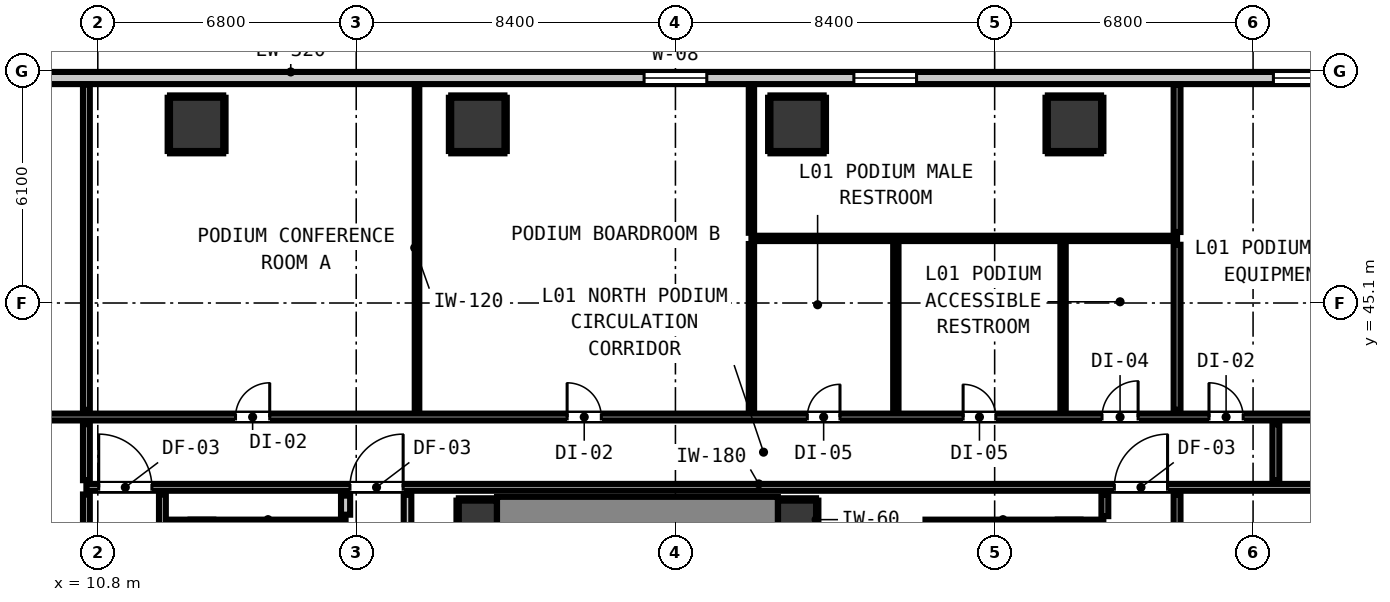
"""IFC4 building model, lengths in metres.
Left out: names, types, materials, properties, quantities, classifications, styles, units other than length and angle.
Written with IfcOpenShell. Run it as: python <this file> out.ifc"""

import sys

from ifc_helpers import new_model, si_unit, direction, frame, frame_2d, origin, origin_2d, place, context, subcontext, project, spatial, rectangle, extrude, element, fill, save


model = new_model("IFC4")
c1 = context("Model", 3, precision=1e-05, world=origin(), true_north=direction((0.0, 1.0)))
c2 = subcontext(c1, "Body", "Model", "MODEL_VIEW")
j1 = project(units=[si_unit("LENGTHUNIT", "METRE"), si_unit("PLANEANGLEUNIT", "RADIAN")], contexts=[c1])
p1 = place(None, origin())
s1 = spatial("IfcSite", under=j1, at=p1, CompositionType="ELEMENT")
p2 = place(p1, origin())
s2 = spatial("IfcBuilding", under=s1, at=p2, CompositionType="ELEMENT")
p3 = place(p2, frame((0.0, 0.0, 5.2)))
s3 = spatial("IfcBuildingStorey", under=s2, at=p3, CompositionType="ELEMENT", Elevation=5.2)
for number, where, z_axis, x_axis in (
    (1, (20.8, 39.4, 0.0), (0.0, 0.0, 1.0), (1.0, 0.0, 0.0)),
    (2, (29.2, 39.4, 0.0), (0.0, 0.0, 1.0), (1.0, 0.0, 0.0)),
):
    element("IfcColumn", number, at=place(p3, frame(where, z_axis=z_axis, x_axis=x_axis)), inside=s3, PredefinedType="COLUMN", context=c2, shape_type="SweptSolid", body=[
        extrude(rectangle(XDim=1.0, YDim=1.0, at=origin_2d()), origin(), (0.0, 0.0, 1.0), 4.2),
    ])
p4 = place(p3, frame((13.24, 31.205, 0.0), z_axis=(0.0, 0.0, 1.0), x_axis=(0.0, 1.0, 0.0)))
e3 = element("IfcWall", 3, at=p4, inside=s3, PredefinedType="SHEAR", context=c2, shape_type="SweptSolid", body=[
    extrude(rectangle(XDim=8.195, YDim=1.2, at=frame_2d((4.097, 0.0))), origin(), (0.0, 0.0, 1.0), 4.2),
])
p5 = place(p3, frame((13.24, 39.1, 0.0), z_axis=(0.0, 0.0, 1.0), x_axis=(1.0, 0.0, 0.0)))
e4 = element("IfcWall", 4, at=p5, inside=s3, PredefinedType="SHEAR", context=c2, shape_type="SweptSolid", body=[
    extrude(rectangle(XDim=4.08, YDim=0.6, at=frame_2d((2.04, 0.0))), origin(), (0.0, 0.0, 1.0), 4.2),
])
p6 = place(p3, frame((36.66, 31.205, 0.0), z_axis=(0.0, 0.0, 1.0), x_axis=(0.0, 1.0, 0.0)))
e5 = element("IfcWall", 5, at=p6, inside=s3, PredefinedType="SHEAR", context=c2, shape_type="SweptSolid", body=[
    extrude(rectangle(XDim=8.195, YDim=1.2, at=frame_2d((4.097, 0.0))), origin(), (0.0, 0.0, 1.0), 4.2),
])
p7 = place(p3, frame((32.58, 39.1, 0.0), z_axis=(0.0, 0.0, 1.0), x_axis=(1.0, 0.0, 0.0)))
e6 = element("IfcWall", 6, at=p7, inside=s3, PredefinedType="SHEAR", context=c2, shape_type="SweptSolid", body=[
    extrude(rectangle(XDim=4.08, YDim=0.6, at=frame_2d((2.04, 0.0))), origin(), (0.0, 0.0, 1.0), 4.2),
])
p8 = place(p3, frame((21.305, 39.4, 0.0), z_axis=(0.0, 0.0, 1.0), x_axis=(1.0, 0.0, 0.0)))
e7 = element("IfcWall", 7, at=p8, inside=s3, PredefinedType="SHEAR", context=c2, shape_type="SweptSolid", body=[
    extrude(rectangle(XDim=7.39, YDim=1.2, at=frame_2d((3.695, 0.0))), origin(), (0.0, 0.0, 1.0), 4.2),
])
for number, where, z_axis, x_axis in (
    (8, (13.4, 49.8, 0.0), (0.0, 0.0, 1.0), (1.0, 0.0, 0.0)),
    (9, (20.8, 49.8, 0.0), (0.0, 0.0, 1.0), (1.0, 0.0, 0.0)),
    (10, (29.2, 49.8, 0.0), (0.0, 0.0, 1.0), (1.0, 0.0, 0.0)),
    (11, (36.5, 49.8, 0.0), (0.0, 0.0, 1.0), (1.0, 0.0, 0.0)),
):
    element("IfcColumn", number, at=place(p3, frame(where, z_axis=z_axis, x_axis=x_axis)), inside=s3, PredefinedType="COLUMN", context=c2, shape_type="SweptSolid", body=[
        extrude(rectangle(XDim=1.4, YDim=1.4, at=origin_2d()), origin(), (0.0, 0.0, 1.0), 4.2),
    ])
p9 = place(p3, frame((6.68, 51.02, 0.0), z_axis=(0.0, 0.0, 1.0), x_axis=(1.0, 0.0, 0.0)))
e12 = element("IfcWall", 12, at=p9, inside=s3, PredefinedType="STANDARD", context=c2, shape_type="SweptSolid", body=[
    extrude(rectangle(XDim=38.64, YDim=0.32, at=frame_2d((19.32, 0.0))), origin(), (0.0, 0.0, 1.0), 3.92),
])
p10 = place(p9, frame((18.495, 0.0, 0.9)))
e13 = element("IfcOpeningElement", 13, at=p10, cuts=e12, PredefinedType="OPENING", context=c2, shape_type="SweptSolid", body=[
    extrude(rectangle(XDim=1.65, YDim=1.75, at=frame_2d((0.825, 0.875))), frame((0.0, 0.17, 0.0), z_axis=(0.0, -1.0, 0.0), x_axis=(1.0, 0.0, 0.0)), (0.0, 0.0, 1.0), 0.34),
])
p11 = place(p9, frame((24.015, 0.0, 0.9)))
e14 = element("IfcOpeningElement", 14, at=p11, cuts=e12, PredefinedType="OPENING", context=c2, shape_type="SweptSolid", body=[
    extrude(rectangle(XDim=1.65, YDim=1.75, at=frame_2d((0.825, 0.875))), frame((0.0, 0.17, 0.0), z_axis=(0.0, -1.0, 0.0), x_axis=(1.0, 0.0, 0.0)), (0.0, 0.0, 1.0), 0.34),
])
p12 = place(p9, frame((35.055, 0.0, 0.9)))
e15 = element("IfcOpeningElement", 15, at=p12, cuts=e12, PredefinedType="OPENING", context=c2, shape_type="SweptSolid", body=[
    extrude(rectangle(XDim=1.65, YDim=1.75, at=frame_2d((0.825, 0.875))), frame((0.0, 0.17, 0.0), z_axis=(0.0, -1.0, 0.0), x_axis=(1.0, 0.0, 0.0)), (0.0, 0.0, 1.0), 0.34),
])
p13 = place(p3, frame((10.5, 40.25, 0.0), z_axis=(0.0, 0.0, 1.0), x_axis=(1.0, 0.0, 0.0)))
e16 = element("IfcWall", 16, at=p13, inside=s3, PredefinedType="PARTITIONING", context=c2, shape_type="SweptSolid", body=[
    extrude(rectangle(XDim=37.148, YDim=0.18, at=frame_2d((18.574, 0.0))), origin(), (0.0, 0.0, 1.0), 3.92),
])
p14 = place(p13, frame((6.935, 0.0, 0.0)))
e17 = element("IfcOpeningElement", 17, at=p14, cuts=e16, PredefinedType="OPENING", context=c2, shape_type="SweptSolid", body=[
    extrude(rectangle(XDim=1.4, YDim=2.15, at=frame_2d((0.7, 1.075))), frame((0.0, 0.1, 0.0), z_axis=(0.0, -1.0, 0.0), x_axis=(1.0, 0.0, 0.0)), (0.0, 0.0, 1.0), 0.2),
])
p15 = place(p13, frame((0.324, 0.0, 0.0)))
e18 = element("IfcOpeningElement", 18, at=p15, cuts=e16, PredefinedType="OPENING", context=c2, shape_type="SweptSolid", body=[
    extrude(rectangle(XDim=1.4, YDim=2.15, at=frame_2d((0.7, 1.075))), frame((0.0, 0.1, 0.0), z_axis=(0.0, -1.0, 0.0), x_axis=(1.0, 0.0, 0.0)), (0.0, 0.0, 1.0), 0.2),
])
p16 = place(p13, frame((27.05, 0.0, 0.0)))
e19 = element("IfcOpeningElement", 19, at=p16, cuts=e16, PredefinedType="OPENING", context=c2, shape_type="SweptSolid", body=[
    extrude(rectangle(XDim=1.4, YDim=2.15, at=frame_2d((0.7, 1.075))), frame((0.0, 0.1, 0.0), z_axis=(0.0, -1.0, 0.0), x_axis=(1.0, 0.0, 0.0)), (0.0, 0.0, 1.0), 0.2),
])
p17 = place(p3, frame((4.352, 42.1, 0.0), z_axis=(0.0, 0.0, 1.0), x_axis=(1.0, 0.0, 0.0)))
e20 = element("IfcWall", 20, at=p17, inside=s3, PredefinedType="PARTITIONING", context=c2, shape_type="SweptSolid", body=[
    extrude(rectangle(XDim=43.296, YDim=0.18, at=frame_2d((21.648, 0.0))), origin(), (0.0, 0.0, 1.0), 3.92),
])
p18 = place(p17, frame((10.072, 0.0, 0.0)))
e21 = element("IfcOpeningElement", 21, at=p18, cuts=e20, PredefinedType="OPENING", context=c2, shape_type="SweptSolid", body=[
    extrude(rectangle(XDim=0.9, YDim=2.1, at=frame_2d((0.45, 1.05))), frame((0.0, 0.1, 0.0), z_axis=(0.0, -1.0, 0.0), x_axis=(1.0, 0.0, 0.0)), (0.0, 0.0, 1.0), 0.2),
])
p19 = place(p17, frame((18.798, 0.0, 0.0)))
e22 = element("IfcOpeningElement", 22, at=p19, cuts=e20, PredefinedType="OPENING", context=c2, shape_type="SweptSolid", body=[
    extrude(rectangle(XDim=0.9, YDim=2.1, at=frame_2d((0.45, 1.05))), frame((0.0, 0.1, 0.0), z_axis=(0.0, -1.0, 0.0), x_axis=(1.0, 0.0, 0.0)), (0.0, 0.0, 1.0), 0.2),
])
p20 = place(p17, frame((25.118, 0.0, 0.0)))
e23 = element("IfcOpeningElement", 23, at=p20, cuts=e20, PredefinedType="OPENING", context=c2, shape_type="SweptSolid", body=[
    extrude(rectangle(XDim=0.86, YDim=2.02, at=frame_2d((0.43, 1.01))), frame((0.0, 0.1, 0.0), z_axis=(0.0, -1.0, 0.0), x_axis=(1.0, 0.0, 0.0)), (0.0, 0.0, 1.0), 0.2),
])
p21 = place(p17, frame((29.218, 0.0, 0.0)))
e24 = element("IfcOpeningElement", 24, at=p21, cuts=e20, PredefinedType="OPENING", context=c2, shape_type="SweptSolid", body=[
    extrude(rectangle(XDim=0.86, YDim=2.02, at=frame_2d((0.43, 1.01))), frame((0.0, 0.1, 0.0), z_axis=(0.0, -1.0, 0.0), x_axis=(1.0, 0.0, 0.0)), (0.0, 0.0, 1.0), 0.2),
])
p22 = place(p17, frame((32.873, 0.0, 0.0)))
e25 = element("IfcOpeningElement", 25, at=p22, cuts=e20, PredefinedType="OPENING", context=c2, shape_type="SweptSolid", body=[
    extrude(rectangle(XDim=0.95, YDim=2.1, at=frame_2d((0.475, 1.05))), frame((0.0, 0.1, 0.0), z_axis=(0.0, -1.0, 0.0), x_axis=(1.0, 0.0, 0.0)), (0.0, 0.0, 1.0), 0.2),
])
p23 = place(p17, frame((35.688, 0.0, 0.0)))
e26 = element("IfcOpeningElement", 26, at=p23, cuts=e20, PredefinedType="OPENING", context=c2, shape_type="SweptSolid", body=[
    extrude(rectangle(XDim=0.9, YDim=2.1, at=frame_2d((0.45, 1.05))), frame((0.0, 0.1, 0.0), z_axis=(0.0, -1.0, 0.0), x_axis=(1.0, 0.0, 0.0)), (0.0, 0.0, 1.0), 0.2),
])
p24 = place(p3, frame((28.0, 46.8, 0.0), z_axis=(0.0, 0.0, 1.0), x_axis=(1.0, 0.0, 0.0)))
e27 = element("IfcWall", 27, at=p24, inside=s3, PredefinedType="PARTITIONING", context=c2, shape_type="SweptSolid", body=[
    extrude(rectangle(XDim=11.2, YDim=0.14, at=frame_2d((5.6, 0.0))), origin(), (0.0, 0.0, 1.0), 3.92),
])
p25 = place(p3, frame((17.32, 39.53, 0.0), z_axis=(0.0, 0.0, 1.0), x_axis=(0.0, 1.0, 0.0)))
e28 = element("IfcWall", 28, at=p25, inside=s3, PredefinedType="PARTITIONING", context=c2, shape_type="SweptSolid", body=[
    extrude(rectangle(XDim=0.502, YDim=0.24, at=frame_2d((0.251, 0.0))), origin(), (0.0, 0.0, 1.0), 3.92),
])
p26 = place(p3, frame((18.95, 38.928, 0.0), z_axis=(0.0, 0.0, 1.0), x_axis=(0.0, 1.0, 0.0)))
e29 = element("IfcWall", 29, at=p26, inside=s3, PredefinedType="PARTITIONING", context=c2, shape_type="SweptSolid", body=[
    extrude(rectangle(XDim=1.124, YDim=0.2, at=frame_2d((0.562, 0.0))), origin(), (0.0, 0.0, 1.0), 3.92),
])
p27 = place(p3, frame((10.5, 21.368, 0.0), z_axis=(0.0, 0.0, 1.0), x_axis=(0.0, 1.0, 0.0)))
e30 = element("IfcWall", 30, at=p27, inside=s3, PredefinedType="PARTITIONING", context=c2, shape_type="SweptSolid", body=[
    extrude(rectangle(XDim=18.694, YDim=0.18, at=frame_2d((9.347, 0.0))), origin(), (0.0, 0.0, 1.0), 3.92),
])
p28 = place(p3, frame((10.5, 40.438, 0.0), z_axis=(0.0, 0.0, 1.0), x_axis=(0.0, 1.0, 0.0)))
e31 = element("IfcWall", 31, at=p28, inside=s3, PredefinedType="PARTITIONING", context=c2, shape_type="SweptSolid", body=[
    extrude(rectangle(XDim=1.474, YDim=0.18, at=frame_2d((0.737, 0.0))), origin(), (0.0, 0.0, 1.0), 3.92),
])
p29 = place(p3, frame((10.5, 42.288, 0.0), z_axis=(0.0, 0.0, 1.0), x_axis=(0.0, 1.0, 0.0)))
e32 = element("IfcWall", 32, at=p29, inside=s3, PredefinedType="PARTITIONING", context=c2, shape_type="SweptSolid", body=[
    extrude(rectangle(XDim=8.56, YDim=0.18, at=frame_2d((4.28, 0.0))), origin(), (0.0, 0.0, 1.0), 3.92),
])
p30 = place(p3, frame((12.5, 21.368, 0.0), z_axis=(0.0, 0.0, 1.0), x_axis=(0.0, 1.0, 0.0)))
e33 = element("IfcWall", 33, at=p30, inside=s3, PredefinedType="PARTITIONING", context=c2, shape_type="SweptSolid", body=[
    extrude(rectangle(XDim=18.694, YDim=0.18, at=frame_2d((9.347, 0.0))), origin(), (0.0, 0.0, 1.0), 3.92),
])
p31 = place(p3, frame((37.3, 39.492, 0.0), z_axis=(0.0, 0.0, 1.0), x_axis=(0.0, 1.0, 0.0)))
e34 = element("IfcWall", 34, at=p31, inside=s3, PredefinedType="PARTITIONING", context=c2, shape_type="SweptSolid", body=[
    extrude(rectangle(XDim=0.57, YDim=0.18, at=frame_2d((0.285, 0.0))), origin(), (0.0, 0.0, 1.0), 3.92),
])
p32 = place(p3, frame((39.2, 21.368, 0.0), z_axis=(0.0, 0.0, 1.0), x_axis=(0.0, 1.0, 0.0)))
e35 = element("IfcWall", 35, at=p32, inside=s3, PredefinedType="PARTITIONING", context=c2, shape_type="SweptSolid", body=[
    extrude(rectangle(XDim=18.694, YDim=0.18, at=frame_2d((9.347, 0.0))), origin(), (0.0, 0.0, 1.0), 3.92),
])
p33 = place(p3, frame((39.2, 42.288, 0.0), z_axis=(0.0, 0.0, 1.0), x_axis=(0.0, 1.0, 0.0)))
e36 = element("IfcWall", 36, at=p33, inside=s3, PredefinedType="PARTITIONING", context=c2, shape_type="SweptSolid", body=[
    extrude(rectangle(XDim=4.344, YDim=0.18, at=frame_2d((2.172, 0.0))), origin(), (0.0, 0.0, 1.0), 3.92),
])
p34 = place(p3, frame((39.2, 46.968, 0.0), z_axis=(0.0, 0.0, 1.0), x_axis=(0.0, 1.0, 0.0)))
e37 = element("IfcWall", 37, at=p34, inside=s3, PredefinedType="PARTITIONING", context=c2, shape_type="SweptSolid", body=[
    extrude(rectangle(XDim=3.88, YDim=0.18, at=frame_2d((1.94, 0.0))), origin(), (0.0, 0.0, 1.0), 3.92),
])
p35 = place(p3, frame((41.8, 40.438, 0.0), z_axis=(0.0, 0.0, 1.0), x_axis=(0.0, 1.0, 0.0)))
e38 = element("IfcWall", 38, at=p35, inside=s3, PredefinedType="PARTITIONING", context=c2, shape_type="SweptSolid", body=[
    extrude(rectangle(XDim=1.474, YDim=0.18, at=frame_2d((0.737, 0.0))), origin(), (0.0, 0.0, 1.0), 3.92),
])
p36 = place(p3, frame((28.0, 42.268, 0.0), z_axis=(0.0, 0.0, 1.0), x_axis=(0.0, 1.0, 0.0)))
e39 = element("IfcWall", 39, at=p36, inside=s3, PredefinedType="PARTITIONING", context=c2, shape_type="SweptSolid", body=[
    extrude(rectangle(XDim=4.384, YDim=0.14, at=frame_2d((2.192, 0.0))), origin(), (0.0, 0.0, 1.0), 3.92),
])
p37 = place(p3, frame((28.0, 46.948, 0.0), z_axis=(0.0, 0.0, 1.0), x_axis=(0.0, 1.0, 0.0)))
e40 = element("IfcWall", 40, at=p37, inside=s3, PredefinedType="PARTITIONING", context=c2, shape_type="SweptSolid", body=[
    extrude(rectangle(XDim=3.9, YDim=0.14, at=frame_2d((1.95, 0.0))), origin(), (0.0, 0.0, 1.0), 3.92),
])
for number, where, z_axis, x_axis in (
    (41, (31.8, 42.268, 0.0), (0.0, 0.0, 1.0), (0.0, 1.0, 0.0)),
    (42, (36.2, 42.268, 0.0), (0.0, 0.0, 1.0), (0.0, 1.0, 0.0)),
):
    element("IfcWall", number, at=place(p3, frame(where, z_axis=z_axis, x_axis=x_axis)), inside=s3, PredefinedType="PARTITIONING", context=c2, shape_type="SweptSolid", body=[
        extrude(rectangle(XDim=4.384, YDim=0.14, at=frame_2d((2.192, 0.0))), origin(), (0.0, 0.0, 1.0), 3.92),
    ])
p38 = place(p3, frame((19.2, 42.258, 0.0), z_axis=(0.0, 0.0, 1.0), x_axis=(0.0, 1.0, 0.0)))
e43 = element("IfcWall", 43, at=p38, inside=s3, PredefinedType="PARTITIONING", context=c2, shape_type="SweptSolid", body=[
    extrude(rectangle(XDim=8.59, YDim=0.12, at=frame_2d((4.295, 0.0))), origin(), (0.0, 0.0, 1.0), 3.92),
])
p39 = place(p3, frame((20.3, 39.932, 0.0), z_axis=(0.0, 0.0, 1.0), x_axis=(1.0, 0.0, 0.0)))
e44 = element("IfcWall", 44, at=p39, inside=s3, PredefinedType="PARTITIONING", context=c2, shape_type="SweptSolid", body=[
    extrude(rectangle(XDim=0.99, YDim=0.06, at=frame_2d((0.495, 0.0))), origin(), (0.0, 0.0, 1.0), 1.45),
])
p40 = place(p3, frame((20.268, 38.9, 0.0), z_axis=(0.0, 0.0, 1.0), x_axis=(0.0, 1.0, 0.0)))
e45 = element("IfcWall", 45, at=p40, inside=s3, PredefinedType="PARTITIONING", context=c2, shape_type="SweptSolid", body=[
    extrude(rectangle(XDim=1.0, YDim=0.06, at=frame_2d((0.5, 0.0))), origin(), (0.0, 0.0, 1.0), 1.45),
])
p41 = place(p3, frame((28.71, 39.932, 0.0), z_axis=(0.0, 0.0, 1.0), x_axis=(1.0, 0.0, 0.0)))
e46 = element("IfcWall", 46, at=p41, inside=s3, PredefinedType="PARTITIONING", context=c2, shape_type="SweptSolid", body=[
    extrude(rectangle(XDim=0.99, YDim=0.06, at=frame_2d((0.495, 0.0))), origin(), (0.0, 0.0, 1.0), 1.45),
])
p42 = place(p3, frame((29.732, 38.9, 0.0), z_axis=(0.0, 0.0, 1.0), x_axis=(0.0, 1.0, 0.0)))
e47 = element("IfcWall", 47, at=p42, inside=s3, PredefinedType="PARTITIONING", context=c2, shape_type="SweptSolid", body=[
    extrude(rectangle(XDim=1.0, YDim=0.06, at=frame_2d((0.5, 0.0))), origin(), (0.0, 0.0, 1.0), 1.45),
])
for number, where, z_axis, x_axis in (
    (48, (12.7, 49.068, 0.0), (0.0, 0.0, 1.0), (1.0, 0.0, 0.0)),
    (49, (12.7, 50.532, 0.0), (0.0, 0.0, 1.0), (1.0, 0.0, 0.0)),
):
    element("IfcWall", number, at=place(p3, frame(where, z_axis=z_axis, x_axis=x_axis)), inside=s3, PredefinedType="PARTITIONING", context=c2, shape_type="SweptSolid", body=[
        extrude(rectangle(XDim=1.4, YDim=0.06, at=frame_2d((0.7, 0.0))), origin(), (0.0, 0.0, 1.0), 1.45),
    ])
for number, where, z_axis, x_axis in (
    (50, (12.668, 49.1, 0.0), (0.0, 0.0, 1.0), (0.0, 1.0, 0.0)),
    (51, (14.132, 49.1, 0.0), (0.0, 0.0, 1.0), (0.0, 1.0, 0.0)),
    (52, (20.1, 49.068, 0.0), (0.0, 0.0, 1.0), (1.0, 0.0, 0.0)),
    (53, (20.1, 50.532, 0.0), (0.0, 0.0, 1.0), (1.0, 0.0, 0.0)),
    (54, (20.068, 49.1, 0.0), (0.0, 0.0, 1.0), (0.0, 1.0, 0.0)),
    (55, (21.532, 49.1, 0.0), (0.0, 0.0, 1.0), (0.0, 1.0, 0.0)),
    (56, (28.5, 49.068, 0.0), (0.0, 0.0, 1.0), (1.0, 0.0, 0.0)),
    (57, (28.5, 50.532, 0.0), (0.0, 0.0, 1.0), (1.0, 0.0, 0.0)),
    (58, (28.468, 49.1, 0.0), (0.0, 0.0, 1.0), (0.0, 1.0, 0.0)),
    (59, (29.932, 49.1, 0.0), (0.0, 0.0, 1.0), (0.0, 1.0, 0.0)),
    (60, (35.8, 49.068, 0.0), (0.0, 0.0, 1.0), (1.0, 0.0, 0.0)),
    (61, (35.8, 50.532, 0.0), (0.0, 0.0, 1.0), (1.0, 0.0, 0.0)),
    (62, (35.768, 49.1, 0.0), (0.0, 0.0, 1.0), (0.0, 1.0, 0.0)),
    (63, (37.232, 49.1, 0.0), (0.0, 0.0, 1.0), (0.0, 1.0, 0.0)),
):
    element("IfcWall", number, at=place(p3, frame(where, z_axis=z_axis, x_axis=x_axis)), inside=s3, PredefinedType="PARTITIONING", context=c2, shape_type="SweptSolid", body=[
        extrude(rectangle(XDim=1.4, YDim=0.06, at=frame_2d((0.7, 0.0))), origin(), (0.0, 0.0, 1.0), 1.45),
    ])
p43 = place(p10, origin())
e64 = element("IfcWindow", 64, at=p43, inside=s3, PartitioningType="SINGLE_PANEL", PredefinedType="WINDOW", context=c2, shape_type="SweptSolid", body=[
    extrude(rectangle(XDim=1.65, YDim=1.75, at=frame_2d((0.825, 0.875))), frame((0.0, 0.03, 0.0), z_axis=(0.0, -1.0, 0.0), x_axis=(1.0, 0.0, 0.0)), (0.0, 0.0, 1.0), 0.06),
])
fill(e13, e64)
p44 = place(p11, origin())
e65 = element("IfcWindow", 65, at=p44, inside=s3, PartitioningType="SINGLE_PANEL", PredefinedType="WINDOW", context=c2, shape_type="SweptSolid", body=[
    extrude(rectangle(XDim=1.65, YDim=1.75, at=frame_2d((0.825, 0.875))), frame((0.0, 0.03, 0.0), z_axis=(0.0, -1.0, 0.0), x_axis=(1.0, 0.0, 0.0)), (0.0, 0.0, 1.0), 0.06),
])
fill(e14, e65)
p45 = place(p12, origin())
e66 = element("IfcWindow", 66, at=p45, inside=s3, PartitioningType="SINGLE_PANEL", PredefinedType="WINDOW", context=c2, shape_type="SweptSolid", body=[
    extrude(rectangle(XDim=1.65, YDim=1.75, at=frame_2d((0.825, 0.875))), frame((0.0, 0.03, 0.0), z_axis=(0.0, -1.0, 0.0), x_axis=(1.0, 0.0, 0.0)), (0.0, 0.0, 1.0), 0.06),
])
fill(e15, e66)
p46 = place(p14, origin())
e67 = element("IfcDoor", 67, at=p46, inside=s3, OperationType="SINGLE_SWING_RIGHT", PredefinedType="DOOR", context=c2, shape_type="SweptSolid", body=[
    extrude(rectangle(XDim=1.4, YDim=2.15, at=frame_2d((0.7, 1.075))), frame((0.0, 0.025, 0.0), z_axis=(0.0, -1.0, 0.0), x_axis=(1.0, 0.0, 0.0)), (0.0, 0.0, 1.0), 0.05),
])
fill(e17, e67)
p47 = place(p15, origin())
e68 = element("IfcDoor", 68, at=p47, inside=s3, OperationType="SINGLE_SWING_LEFT", PredefinedType="DOOR", context=c2, shape_type="SweptSolid", body=[
    extrude(rectangle(XDim=1.4, YDim=2.15, at=frame_2d((0.7, 1.075))), frame((0.0, 0.025, 0.0), z_axis=(0.0, -1.0, 0.0), x_axis=(1.0, 0.0, 0.0)), (0.0, 0.0, 1.0), 0.05),
])
fill(e18, e68)
p48 = place(p16, origin())
e69 = element("IfcDoor", 69, at=p48, inside=s3, OperationType="SINGLE_SWING_RIGHT", PredefinedType="DOOR", context=c2, shape_type="SweptSolid", body=[
    extrude(rectangle(XDim=1.4, YDim=2.15, at=frame_2d((0.7, 1.075))), frame((0.0, 0.025, 0.0), z_axis=(0.0, -1.0, 0.0), x_axis=(1.0, 0.0, 0.0)), (0.0, 0.0, 1.0), 0.05),
])
fill(e19, e69)
p49 = place(p18, origin())
e70 = element("IfcDoor", 70, at=p49, inside=s3, OperationType="SINGLE_SWING_RIGHT", PredefinedType="DOOR", context=c2, shape_type="SweptSolid", body=[
    extrude(rectangle(XDim=0.9, YDim=2.1, at=frame_2d((0.45, 1.05))), frame((0.0, 0.025, 0.0), z_axis=(0.0, -1.0, 0.0), x_axis=(1.0, 0.0, 0.0)), (0.0, 0.0, 1.0), 0.05),
])
fill(e21, e70)
p50 = place(p19, origin())
e71 = element("IfcDoor", 71, at=p50, inside=s3, OperationType="SINGLE_SWING_LEFT", PredefinedType="DOOR", context=c2, shape_type="SweptSolid", body=[
    extrude(rectangle(XDim=0.9, YDim=2.1, at=frame_2d((0.45, 1.05))), frame((0.0, 0.025, 0.0), z_axis=(0.0, -1.0, 0.0), x_axis=(1.0, 0.0, 0.0)), (0.0, 0.0, 1.0), 0.05),
])
fill(e22, e71)
p51 = place(p20, origin())
e72 = element("IfcDoor", 72, at=p51, inside=s3, OperationType="SINGLE_SWING_RIGHT", PredefinedType="DOOR", context=c2, shape_type="SweptSolid", body=[
    extrude(rectangle(XDim=0.86, YDim=2.02, at=frame_2d((0.43, 1.01))), frame((0.0, 0.025, 0.0), z_axis=(0.0, -1.0, 0.0), x_axis=(1.0, 0.0, 0.0)), (0.0, 0.0, 1.0), 0.05),
])
fill(e23, e72)
p52 = place(p21, origin())
e73 = element("IfcDoor", 73, at=p52, inside=s3, OperationType="SINGLE_SWING_LEFT", PredefinedType="DOOR", context=c2, shape_type="SweptSolid", body=[
    extrude(rectangle(XDim=0.86, YDim=2.02, at=frame_2d((0.43, 1.01))), frame((0.0, 0.025, 0.0), z_axis=(0.0, -1.0, 0.0), x_axis=(1.0, 0.0, 0.0)), (0.0, 0.0, 1.0), 0.05),
])
fill(e24, e73)
p53 = place(p22, origin())
e74 = element("IfcDoor", 74, at=p53, inside=s3, OperationType="SINGLE_SWING_RIGHT", PredefinedType="DOOR", context=c2, shape_type="SweptSolid", body=[
    extrude(rectangle(XDim=0.95, YDim=2.1, at=frame_2d((0.475, 1.05))), frame((0.0, 0.025, 0.0), z_axis=(0.0, -1.0, 0.0), x_axis=(1.0, 0.0, 0.0)), (0.0, 0.0, 1.0), 0.05),
])
fill(e25, e74)
p54 = place(p23, origin())
e75 = element("IfcDoor", 75, at=p54, inside=s3, OperationType="SINGLE_SWING_LEFT", PredefinedType="DOOR", context=c2, shape_type="SweptSolid", body=[
    extrude(rectangle(XDim=0.9, YDim=2.1, at=frame_2d((0.45, 1.05))), frame((0.0, 0.025, 0.0), z_axis=(0.0, -1.0, 0.0), x_axis=(1.0, 0.0, 0.0)), (0.0, 0.0, 1.0), 0.05),
])
fill(e26, e75)
save(model, sys.argv[1])
